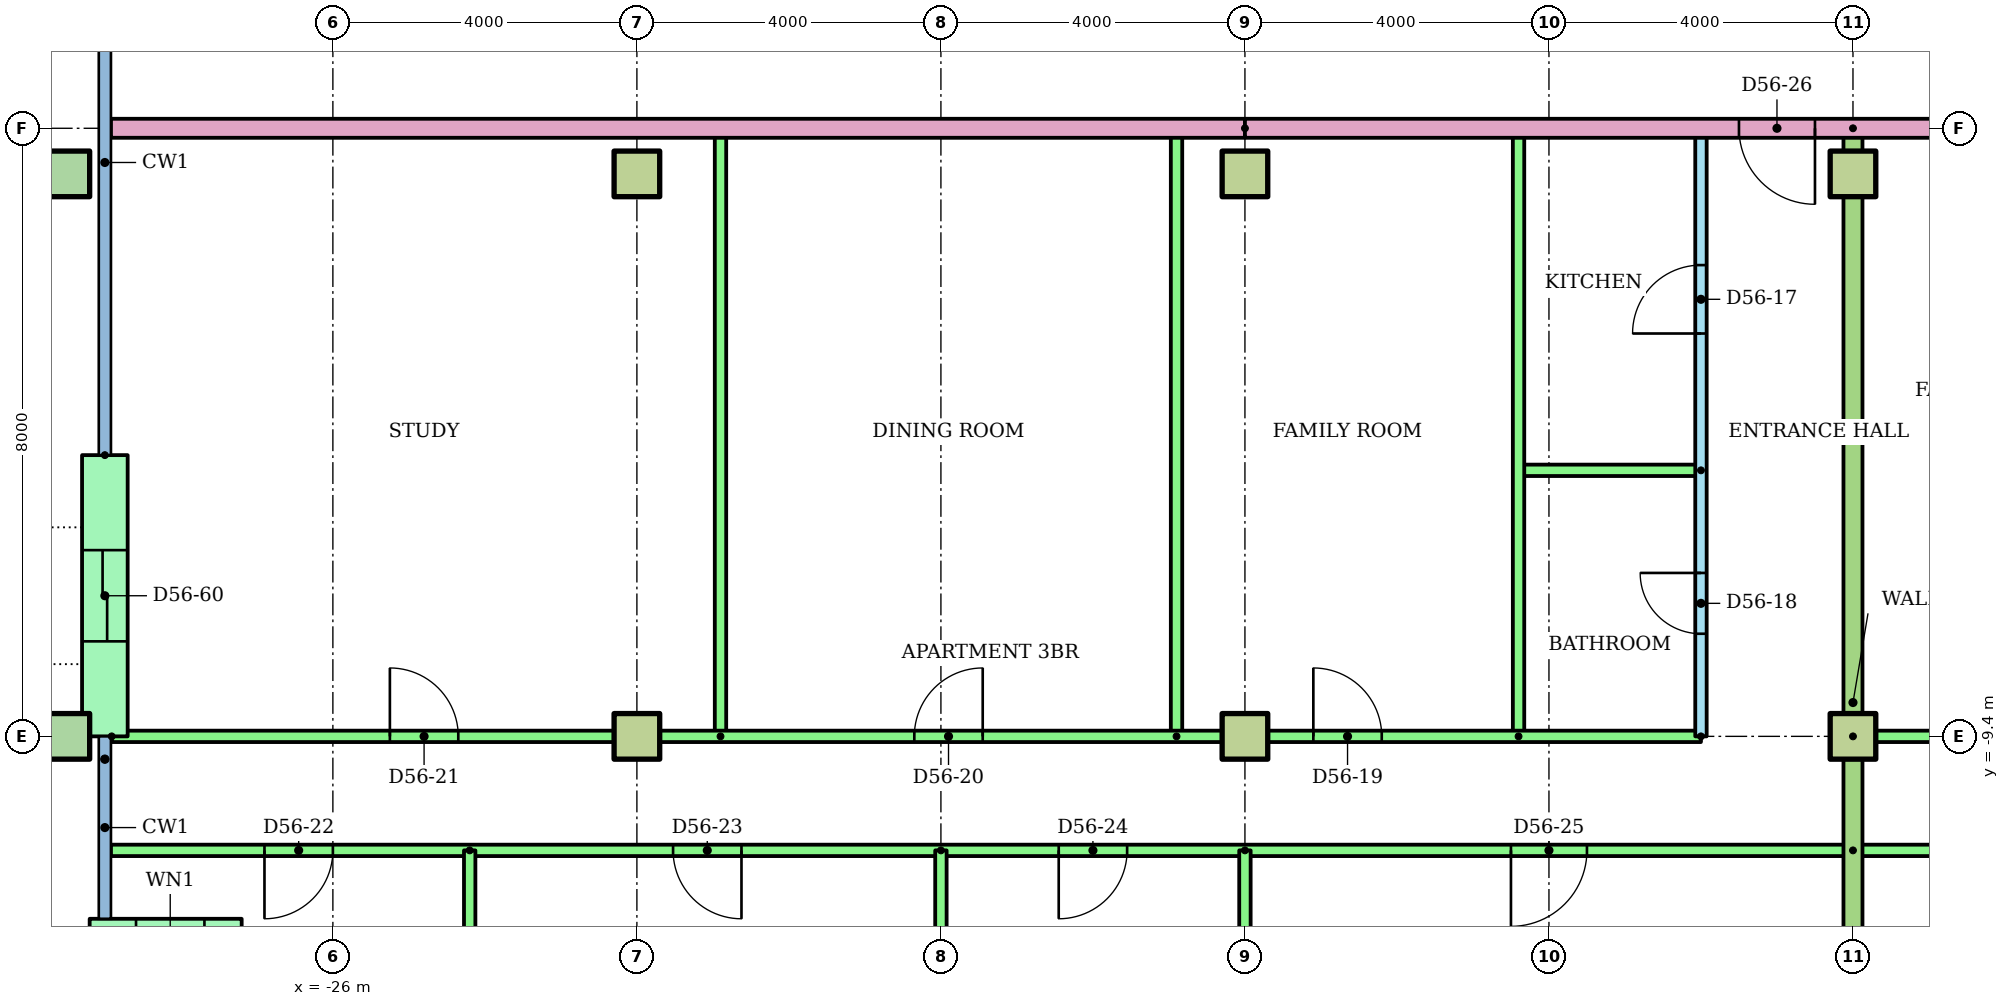
"""IFC4 building model, lengths in metres.
Left out: names, types, materials, properties, quantities, classifications, styles, units other than length and angle.
Written with IfcOpenShell. Run it as: python <this file> out.ifc"""

import sys

from ifc_helpers import new_model, si_unit, direction, frame, frame_2d, origin, origin_2d, place, context, subcontext, project, spatial, rectangle, hollow_rectangle, extrude, element, fill, save


model = new_model("IFC4")
c1 = context("Model", 3, precision=1e-05, world=origin(), true_north=direction((0.0, 1.0)))
c2 = subcontext(c1, "Body", "Model", "MODEL_VIEW")
j1 = project(units=[si_unit("LENGTHUNIT", "METRE"), si_unit("PLANEANGLEUNIT", "RADIAN")], contexts=[c1])
p1 = place(None, origin())
s1 = spatial("IfcSite", under=j1, at=p1, CompositionType="ELEMENT")
p2 = place(p1, origin())
s2 = spatial("IfcBuilding", under=s1, at=p2, CompositionType="ELEMENT")
p3 = place(p2, frame((0.0, 0.0, 217.2)))
s3 = spatial("IfcBuildingStorey", under=s2, at=p3, CompositionType="ELEMENT", Elevation=217.2)
p4 = place(p3, frame((-29.5, -9.4, 0.0)))
e1 = element("IfcColumn", 1, at=p4, inside=s3, PredefinedType="COLUMN", context=c2, shape_type="SweptSolid", body=[
    extrude(hollow_rectangle(XDim=0.6, YDim=0.6, WallThickness=0.03, at=origin_2d()), origin(), (0.0, 0.0, 1.0), 3.2),
])
for number, where in (
    (2, (-22.0, -9.4, 0.0)),
    (3, (-14.0, -9.4, 0.0)),
    (4, (-6.0, -9.4, 0.0)),
):
    element("IfcColumn", number, at=place(p3, frame(where)), inside=s3, PredefinedType="COLUMN", context=c2, shape_type="SweptSolid", body=[
        extrude(rectangle(XDim=0.6, YDim=0.6, at=origin_2d()), origin(), (0.0, 0.0, 1.0), 3.2),
    ])
p5 = place(p3, frame((-29.5, -2.0, 0.0)))
e5 = element("IfcColumn", 5, at=p5, inside=s3, PredefinedType="COLUMN", context=c2, shape_type="SweptSolid", body=[
    extrude(hollow_rectangle(XDim=0.6, YDim=0.6, WallThickness=0.03, at=origin_2d()), origin(), (0.0, 0.0, 1.0), 3.2),
])
for number, where in (
    (6, (-22.0, -2.0, 0.0)),
    (7, (-14.0, -2.0, 0.0)),
    (8, (-6.0, -2.0, 0.0)),
):
    element("IfcColumn", number, at=place(p3, frame(where)), inside=s3, PredefinedType="COLUMN", context=c2, shape_type="SweptSolid", body=[
        extrude(rectangle(XDim=0.6, YDim=0.6, at=origin_2d()), origin(), (0.0, 0.0, 1.0), 3.2),
    ])
p6 = place(p3, frame((-29.0, -5.7, 0.0), z_axis=(0.0, 0.0, 1.0), x_axis=(0.0, -1.0, 0.0)))
e9 = element("IfcWall", 9, at=p6, inside=s3, PredefinedType="STANDARD", context=c2, shape_type="SweptSolid", body=[
    extrude(rectangle(XDim=3.7, YDim=0.6, at=frame_2d((1.85, 0.0))), origin(), (0.0, 0.0, 1.0), 2.92),
])
p7 = place(p6, frame((1.25, 0.0, 0.0)))
e10 = element("IfcOpeningElement", 10, at=p7, cuts=e9, PredefinedType="OPENING", context=c2, shape_type="SweptSolid", body=[
    extrude(rectangle(XDim=1.2, YDim=2.1, at=frame_2d((0.6, 1.05))), frame((0.0, 0.31, 0.0), z_axis=(0.0, -1.0, 0.0), x_axis=(1.0, 0.0, 0.0)), (0.0, 0.0, 1.0), 0.62),
])
p8 = place(p3, frame((-29.2, -12.1, 0.0)))
e11 = element("IfcWall", 11, at=p8, inside=s3, PredefinedType="STANDARD", context=c2, shape_type="SweptSolid", body=[
    extrude(rectangle(XDim=2.0, YDim=0.6, at=frame_2d((1.0, 0.0))), origin(), (0.0, 0.0, 1.0), 2.92),
])
p9 = place(p8, frame((0.61, 0.0, 0.9)))
e12 = element("IfcOpeningElement", 12, at=p9, cuts=e11, PredefinedType="OPENING", context=c2, shape_type="SweptSolid", body=[
    extrude(rectangle(XDim=0.9, YDim=1.5, at=frame_2d((0.45, 0.75))), frame((0.0, 0.31, 0.0), z_axis=(0.0, -1.0, 0.0), x_axis=(1.0, 0.0, 0.0)), (0.0, 0.0, 1.0), 0.62),
])
p10 = place(p3, frame((-8.0, -9.4, 0.0), z_axis=(0.0, 0.0, 1.0), x_axis=(0.0, 1.0, 0.0)))
e13 = element("IfcWall", 13, at=p10, inside=s3, PredefinedType="PARTITIONING", context=c2, shape_type="SweptSolid", body=[
    extrude(rectangle(XDim=8.0, YDim=0.15, at=frame_2d((4.0, 0.0))), origin(), (0.0, 0.0, 1.0), 2.4),
])
p11 = place(p10, frame((5.3, 0.0, 0.0)))
e14 = element("IfcOpeningElement", 14, at=p11, cuts=e13, PredefinedType="OPENING", context=c2, shape_type="SweptSolid", body=[
    extrude(rectangle(XDim=0.9, YDim=2.1, at=frame_2d((0.45, 1.05))), frame((0.0, 0.085, 0.0), z_axis=(0.0, -1.0, 0.0), x_axis=(1.0, 0.0, 0.0)), (0.0, 0.0, 1.0), 0.17),
])
p12 = place(p10, frame((1.35, 0.0, 0.0)))
e15 = element("IfcOpeningElement", 15, at=p12, cuts=e13, PredefinedType="OPENING", context=c2, shape_type="SweptSolid", body=[
    extrude(rectangle(XDim=0.8, YDim=2.1, at=frame_2d((0.4, 1.05))), frame((0.0, 0.085, 0.0), z_axis=(0.0, -1.0, 0.0), x_axis=(1.0, 0.0, 0.0)), (0.0, 0.0, 1.0), 0.17),
])
p13 = place(p3, frame((-8.0, -5.9, 0.0), z_axis=(0.0, 0.0, 1.0), x_axis=(-1.0, 0.0, 0.0)))
e16 = element("IfcWall", 16, at=p13, inside=s3, PredefinedType="PARTITIONING", context=c2, shape_type="SweptSolid", body=[
    extrude(rectangle(XDim=2.4, YDim=0.15, at=frame_2d((1.2, 0.0))), origin(), (0.0, 0.0, 1.0), 2.4),
])
for number, where, z_axis, x_axis in (
    (17, (-10.4, -9.4, 0.0), (0.0, 0.0, 1.0), (0.0, 1.0, 0.0)),
    (18, (-14.9, -9.4, 0.0), (0.0, 0.0, 1.0), (0.0, 1.0, 0.0)),
    (19, (-20.9, -9.4, 0.0), (0.0, 0.0, 1.0), (0.0, 1.0, 0.0)),
):
    element("IfcWall", number, at=place(p3, frame(where, z_axis=z_axis, x_axis=x_axis)), inside=s3, PredefinedType="PARTITIONING", context=c2, shape_type="SweptSolid", body=[
        extrude(rectangle(XDim=8.0, YDim=0.15, at=frame_2d((4.0, 0.0))), origin(), (0.0, 0.0, 1.0), 2.4),
    ])
p14 = place(p3, frame((-28.91, -9.4, 0.0)))
e20 = element("IfcWall", 20, at=p14, inside=s3, PredefinedType="PARTITIONING", context=c2, shape_type="SweptSolid", body=[
    extrude(rectangle(XDim=20.91, YDim=0.15, at=frame_2d((10.455, 0.0))), origin(), (0.0, 0.0, 1.0), 2.4),
])
p15 = place(p14, frame((15.81, 0.0, 0.0)))
e21 = element("IfcOpeningElement", 21, at=p15, cuts=e20, PredefinedType="OPENING", context=c2, shape_type="SweptSolid", body=[
    extrude(rectangle(XDim=0.9, YDim=2.1, at=frame_2d((0.45, 1.05))), frame((0.0, 0.085, 0.0), z_axis=(0.0, -1.0, 0.0), x_axis=(1.0, 0.0, 0.0)), (0.0, 0.0, 1.0), 0.17),
])
p16 = place(p14, frame((10.56, 0.0, 0.0)))
e22 = element("IfcOpeningElement", 22, at=p16, cuts=e20, PredefinedType="OPENING", context=c2, shape_type="SweptSolid", body=[
    extrude(rectangle(XDim=0.9, YDim=2.1, at=frame_2d((0.45, 1.05))), frame((0.0, 0.085, 0.0), z_axis=(0.0, -1.0, 0.0), x_axis=(1.0, 0.0, 0.0)), (0.0, 0.0, 1.0), 0.17),
])
p17 = place(p14, frame((3.66, 0.0, 0.0)))
e23 = element("IfcOpeningElement", 23, at=p17, cuts=e20, PredefinedType="OPENING", context=c2, shape_type="SweptSolid", body=[
    extrude(rectangle(XDim=0.9, YDim=2.1, at=frame_2d((0.45, 1.05))), frame((0.0, 0.085, 0.0), z_axis=(0.0, -1.0, 0.0), x_axis=(1.0, 0.0, 0.0)), (0.0, 0.0, 1.0), 0.17),
])
p18 = place(p3, frame((-6.0, -10.9, 0.0), z_axis=(0.0, 0.0, 1.0), x_axis=(-1.0, 0.0, 0.0)))
e24 = element("IfcWall", 24, at=p18, inside=s3, PredefinedType="PARTITIONING", context=c2, shape_type="SweptSolid", body=[
    extrude(rectangle(XDim=22.92, YDim=0.15, at=frame_2d((11.46, 0.0))), origin(), (0.0, 0.0, 1.0), 2.4),
])
p19 = place(p18, frame((20.0, 0.0, 0.0)))
e25 = element("IfcOpeningElement", 25, at=p19, cuts=e24, PredefinedType="OPENING", context=c2, shape_type="SweptSolid", body=[
    extrude(rectangle(XDim=0.9, YDim=2.1, at=frame_2d((0.45, 1.05))), frame((0.0, 0.085, 0.0), z_axis=(0.0, -1.0, 0.0), x_axis=(1.0, 0.0, 0.0)), (0.0, 0.0, 1.0), 0.17),
])
p20 = place(p18, frame((14.624, 0.0, 0.0)))
e26 = element("IfcOpeningElement", 26, at=p20, cuts=e24, PredefinedType="OPENING", context=c2, shape_type="SweptSolid", body=[
    extrude(rectangle(XDim=0.9, YDim=2.1, at=frame_2d((0.45, 1.05))), frame((0.0, 0.085, 0.0), z_axis=(0.0, -1.0, 0.0), x_axis=(1.0, 0.0, 0.0)), (0.0, 0.0, 1.0), 0.17),
])
p21 = place(p18, frame((9.55, 0.0, 0.0)))
e27 = element("IfcOpeningElement", 27, at=p21, cuts=e24, PredefinedType="OPENING", context=c2, shape_type="SweptSolid", body=[
    extrude(rectangle(XDim=0.9, YDim=2.1, at=frame_2d((0.45, 1.05))), frame((0.0, 0.085, 0.0), z_axis=(0.0, -1.0, 0.0), x_axis=(1.0, 0.0, 0.0)), (0.0, 0.0, 1.0), 0.17),
])
p22 = place(p18, frame((3.5, 0.0, 0.0)))
e28 = element("IfcOpeningElement", 28, at=p22, cuts=e24, PredefinedType="OPENING", context=c2, shape_type="SweptSolid", body=[
    extrude(rectangle(XDim=1.0, YDim=2.1, at=frame_2d((0.5, 1.05))), frame((0.0, 0.085, 0.0), z_axis=(0.0, -1.0, 0.0), x_axis=(1.0, 0.0, 0.0)), (0.0, 0.0, 1.0), 0.17),
])
p23 = place(p3, frame((-24.2, -10.9, 0.0), z_axis=(0.0, 0.0, 1.0), x_axis=(0.0, -1.0, 0.0)))
e29 = element("IfcWall", 29, at=p23, inside=s3, PredefinedType="PARTITIONING", context=c2, shape_type="SweptSolid", body=[
    extrude(rectangle(XDim=3.82, YDim=0.15, at=frame_2d((1.91, 0.0))), origin(), (0.0, 0.0, 1.0), 2.4),
])
p24 = place(p3, frame((-18.0, -10.9, 0.0), z_axis=(0.0, 0.0, 1.0), x_axis=(0.0, -1.0, 0.0)))
e30 = element("IfcWall", 30, at=p24, inside=s3, PredefinedType="PARTITIONING", context=c2, shape_type="SweptSolid", body=[
    extrude(rectangle(XDim=5.621, YDim=0.15, at=frame_2d((2.811, 0.0))), origin(), (0.0, 0.0, 1.0), 2.4),
])
p25 = place(p3, frame((-14.0, -10.9, 0.0), z_axis=(0.0, 0.0, 1.0), x_axis=(0.0, -1.0, 0.0)))
e31 = element("IfcWall", 31, at=p25, inside=s3, PredefinedType="PARTITIONING", context=c2, shape_type="SweptSolid", body=[
    extrude(rectangle(XDim=5.61, YDim=0.15, at=frame_2d((2.805, 0.0))), origin(), (0.0, 0.0, 1.0), 2.4),
])
p26 = place(p3, frame((-6.0, -9.4, 0.0)))
e32 = element("IfcWall", 32, at=p26, inside=s3, PredefinedType="PARTITIONING", context=c2, shape_type="SweptSolid", body=[
    extrude(rectangle(XDim=6.0, YDim=0.15, at=frame_2d((3.0, 0.0))), origin(), (0.0, 0.0, 1.0), 2.4),
])
p27 = place(p26, frame((1.35, 0.0, 0.0)))
e33 = element("IfcOpeningElement", 33, at=p27, cuts=e32, PredefinedType="OPENING", context=c2, shape_type="SweptSolid", body=[
    extrude(rectangle(XDim=0.9, YDim=2.1, at=frame_2d((0.45, 1.05))), frame((0.0, 0.085, 0.0), z_axis=(0.0, -1.0, 0.0), x_axis=(1.0, 0.0, 0.0)), (0.0, 0.0, 1.0), 0.17),
])
p28 = place(p3, frame((2.0, -10.9, 0.0), z_axis=(0.0, 0.0, 1.0), x_axis=(-1.0, 0.0, 0.0)))
e34 = element("IfcWall", 34, at=p28, inside=s3, PredefinedType="PARTITIONING", context=c2, shape_type="SweptSolid", body=[
    extrude(rectangle(XDim=8.0, YDim=0.15, at=frame_2d((4.0, 0.0))), origin(), (0.0, 0.0, 1.0), 2.4),
])
p29 = place(p28, frame((5.55, 0.0, 0.0)))
e35 = element("IfcOpeningElement", 35, at=p29, cuts=e34, PredefinedType="OPENING", context=c2, shape_type="SweptSolid", body=[
    extrude(rectangle(XDim=0.9, YDim=2.1, at=frame_2d((0.45, 1.05))), frame((0.0, 0.085, 0.0), z_axis=(0.0, -1.0, 0.0), x_axis=(1.0, 0.0, 0.0)), (0.0, 0.0, 1.0), 0.17),
])
p30 = place(p28, frame((1.5, 0.0, 0.0)))
e36 = element("IfcOpeningElement", 36, at=p30, cuts=e34, PredefinedType="OPENING", context=c2, shape_type="SweptSolid", body=[
    extrude(rectangle(XDim=1.0, YDim=2.1, at=frame_2d((0.5, 1.05))), frame((0.0, 0.085, 0.0), z_axis=(0.0, -1.0, 0.0), x_axis=(1.0, 0.0, 0.0)), (0.0, 0.0, 1.0), 0.17),
])
p31 = place(p3, frame((-6.0, -1.4, 0.0), z_axis=(0.0, 0.0, 1.0), x_axis=(0.0, -1.0, 0.0)))
e37 = element("IfcWall", 37, at=p31, inside=s3, PredefinedType="PARTITIONING", context=c2, shape_type="SweptSolid", body=[
    extrude(rectangle(XDim=15.11, YDim=0.25, at=frame_2d((7.555, 0.0))), origin(), (0.0, 0.0, 1.0), 2.4),
])
p32 = place(p3, frame((-14.0, -1.4, 0.0), z_axis=(0.0, 0.0, 1.0), x_axis=(-1.0, 0.0, 0.0)))
e38 = element("IfcWall", 38, at=p32, inside=s3, PredefinedType="PARTITIONING", context=c2, shape_type="SweptSolid", body=[
    extrude(rectangle(XDim=14.92, YDim=0.25, at=frame_2d((7.46, 0.0))), origin(), (0.0, 0.0, 1.0), 2.4),
])
p33 = place(p3, frame((14.0, -1.4, 0.0), z_axis=(0.0, 0.0, 1.0), x_axis=(-1.0, 0.0, 0.0)))
e39 = element("IfcWall", 39, at=p33, inside=s3, PredefinedType="PARTITIONING", context=c2, shape_type="SweptSolid", body=[
    extrude(rectangle(XDim=28.0, YDim=0.25, at=frame_2d((14.0, 0.0))), origin(), (0.0, 0.0, 1.0), 2.4),
])
p34 = place(p33, frame((20.5, 0.0, 0.0)))
e40 = element("IfcOpeningElement", 40, at=p34, cuts=e39, PredefinedType="OPENING", context=c2, shape_type="SweptSolid", body=[
    extrude(rectangle(XDim=1.0, YDim=2.1, at=frame_2d((0.5, 1.05))), frame((0.0, 0.135, 0.0), z_axis=(0.0, -1.0, 0.0), x_axis=(1.0, 0.0, 0.0)), (0.0, 0.0, 1.0), 0.27),
])
p35 = place(p33, frame((12.5, 0.0, 0.0)))
e41 = element("IfcOpeningElement", 41, at=p35, cuts=e39, PredefinedType="OPENING", context=c2, shape_type="SweptSolid", body=[
    extrude(rectangle(XDim=1.0, YDim=2.1, at=frame_2d((0.5, 1.05))), frame((0.0, 0.135, 0.0), z_axis=(0.0, -1.0, 0.0), x_axis=(1.0, 0.0, 0.0)), (0.0, 0.0, 1.0), 0.27),
])
p36 = place(p33, frame((10.5, 0.0, 0.0)))
e42 = element("IfcOpeningElement", 42, at=p36, cuts=e39, PredefinedType="OPENING", context=c2, shape_type="SweptSolid", body=[
    extrude(rectangle(XDim=1.0, YDim=2.1, at=frame_2d((0.5, 1.05))), frame((0.0, 0.135, 0.0), z_axis=(0.0, -1.0, 0.0), x_axis=(1.0, 0.0, 0.0)), (0.0, 0.0, 1.0), 0.27),
])
p37 = place(p11, origin())
e43 = element("IfcDoor", 43, at=p37, inside=s3, OperationType="SINGLE_SWING_LEFT", PredefinedType="DOOR", context=c2, shape_type="SweptSolid", body=[
    extrude(rectangle(XDim=0.9, YDim=2.1, at=frame_2d((0.45, 1.05))), frame((0.0, 0.025, 0.0), z_axis=(0.0, -1.0, 0.0), x_axis=(1.0, 0.0, 0.0)), (0.0, 0.0, 1.0), 0.05),
])
fill(e14, e43)
p38 = place(p12, origin())
e44 = element("IfcDoor", 44, at=p38, inside=s3, OperationType="SINGLE_SWING_RIGHT", PredefinedType="DOOR", context=c2, shape_type="SweptSolid", body=[
    extrude(rectangle(XDim=0.8, YDim=2.1, at=frame_2d((0.4, 1.05))), frame((0.0, 0.025, 0.0), z_axis=(0.0, -1.0, 0.0), x_axis=(1.0, 0.0, 0.0)), (0.0, 0.0, 1.0), 0.05),
])
fill(e15, e44)
p39 = place(p15, origin())
e45 = element("IfcDoor", 45, at=p39, inside=s3, OperationType="SINGLE_SWING_LEFT", PredefinedType="DOOR", context=c2, shape_type="SweptSolid", body=[
    extrude(rectangle(XDim=0.9, YDim=2.1, at=frame_2d((0.45, 1.05))), frame((0.0, 0.025, 0.0), z_axis=(0.0, -1.0, 0.0), x_axis=(1.0, 0.0, 0.0)), (0.0, 0.0, 1.0), 0.05),
])
fill(e21, e45)
p40 = place(p16, origin())
e46 = element("IfcDoor", 46, at=p40, inside=s3, OperationType="SINGLE_SWING_RIGHT", PredefinedType="DOOR", context=c2, shape_type="SweptSolid", body=[
    extrude(rectangle(XDim=0.9, YDim=2.1, at=frame_2d((0.45, 1.05))), frame((0.0, 0.025, 0.0), z_axis=(0.0, -1.0, 0.0), x_axis=(1.0, 0.0, 0.0)), (0.0, 0.0, 1.0), 0.05),
])
fill(e22, e46)
p41 = place(p17, origin())
e47 = element("IfcDoor", 47, at=p41, inside=s3, OperationType="SINGLE_SWING_LEFT", PredefinedType="DOOR", context=c2, shape_type="SweptSolid", body=[
    extrude(rectangle(XDim=0.9, YDim=2.1, at=frame_2d((0.45, 1.05))), frame((0.0, 0.025, 0.0), z_axis=(0.0, -1.0, 0.0), x_axis=(1.0, 0.0, 0.0)), (0.0, 0.0, 1.0), 0.05),
])
fill(e23, e47)
p42 = place(p19, origin())
e48 = element("IfcDoor", 48, at=p42, inside=s3, OperationType="SINGLE_SWING_RIGHT", PredefinedType="DOOR", context=c2, shape_type="SweptSolid", body=[
    extrude(rectangle(XDim=0.9, YDim=2.1, at=frame_2d((0.45, 1.05))), frame((0.0, 0.025, 0.0), z_axis=(0.0, -1.0, 0.0), x_axis=(1.0, 0.0, 0.0)), (0.0, 0.0, 1.0), 0.05),
])
fill(e25, e48)
p43 = place(p20, origin())
e49 = element("IfcDoor", 49, at=p43, inside=s3, OperationType="SINGLE_SWING_LEFT", PredefinedType="DOOR", context=c2, shape_type="SweptSolid", body=[
    extrude(rectangle(XDim=0.9, YDim=2.1, at=frame_2d((0.45, 1.05))), frame((0.0, 0.025, 0.0), z_axis=(0.0, -1.0, 0.0), x_axis=(1.0, 0.0, 0.0)), (0.0, 0.0, 1.0), 0.05),
])
fill(e26, e49)
p44 = place(p21, origin())
e50 = element("IfcDoor", 50, at=p44, inside=s3, OperationType="SINGLE_SWING_RIGHT", PredefinedType="DOOR", context=c2, shape_type="SweptSolid", body=[
    extrude(rectangle(XDim=0.9, YDim=2.1, at=frame_2d((0.45, 1.05))), frame((0.0, 0.025, 0.0), z_axis=(0.0, -1.0, 0.0), x_axis=(1.0, 0.0, 0.0)), (0.0, 0.0, 1.0), 0.05),
])
fill(e27, e50)
p45 = place(p22, origin())
e51 = element("IfcDoor", 51, at=p45, inside=s3, OperationType="SINGLE_SWING_RIGHT", PredefinedType="DOOR", context=c2, shape_type="SweptSolid", body=[
    extrude(rectangle(XDim=1.0, YDim=2.1, at=frame_2d((0.5, 1.05))), frame((0.0, 0.025, 0.0), z_axis=(0.0, -1.0, 0.0), x_axis=(1.0, 0.0, 0.0)), (0.0, 0.0, 1.0), 0.05),
])
fill(e28, e51)
p46 = place(p34, origin())
e52 = element("IfcDoor", 52, at=p46, inside=s3, OperationType="SINGLE_SWING_LEFT", PredefinedType="DOOR", context=c2, shape_type="SweptSolid", body=[
    extrude(rectangle(XDim=1.0, YDim=2.1, at=frame_2d((0.5, 1.05))), frame((0.0, 0.025, 0.0), z_axis=(0.0, -1.0, 0.0), x_axis=(1.0, 0.0, 0.0)), (0.0, 0.0, 1.0), 0.05),
])
fill(e40, e52)
p47 = place(p7, origin())
e53 = element("IfcDoor", 53, at=p47, inside=s3, OperationType="SLIDING_TO_LEFT", PredefinedType="DOOR", context=c2, shape_type="SweptSolid", body=[
    extrude(rectangle(XDim=1.2, YDim=2.1, at=frame_2d((0.6, 1.05))), frame((0.0, 0.025, 0.0), z_axis=(0.0, -1.0, 0.0), x_axis=(1.0, 0.0, 0.0)), (0.0, 0.0, 1.0), 0.05),
])
fill(e10, e53)
save(model, sys.argv[1])
